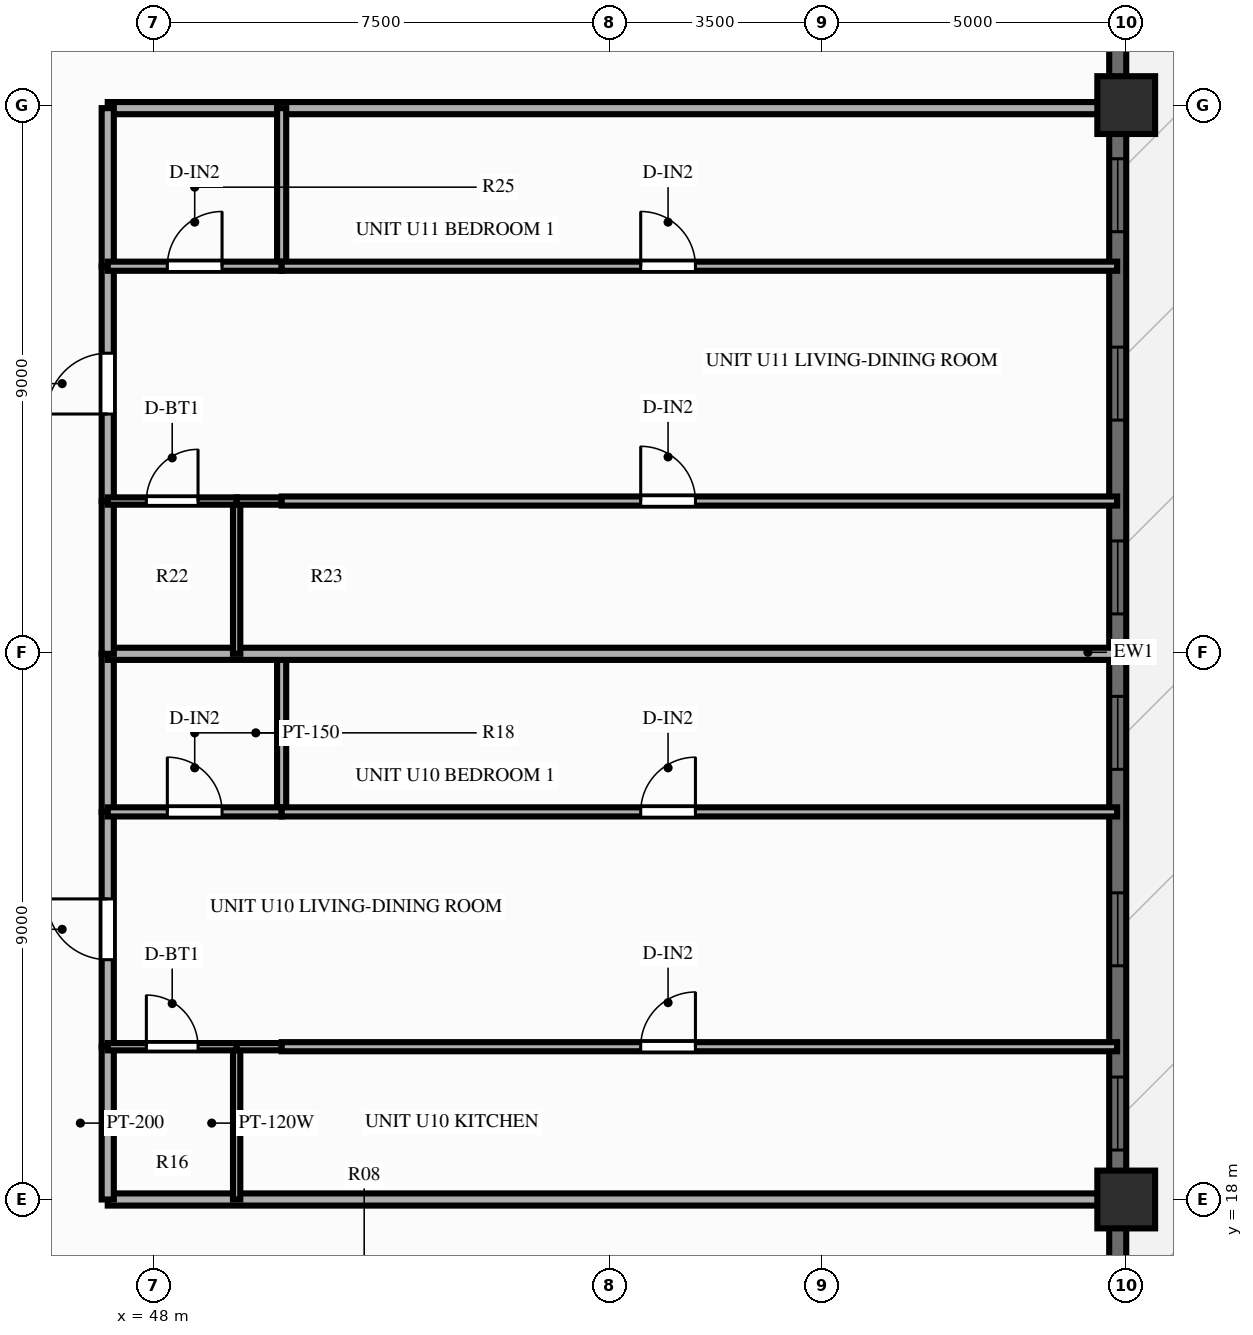
"""IFC4 building model, lengths in metres.
Left out: names, types, materials, properties, quantities, classifications, styles, units other than length and angle.
Written with IfcOpenShell. Run it as: python <this file> out.ifc"""

import sys

from ifc_helpers import new_model, si_unit, direction, frame, frame_2d, origin, origin_2d, place, context, subcontext, project, spatial, rectangle, extrude, source, transform, mapped, element, fill, save


model = new_model("IFC4")
c1 = context("Model", 3, precision=1e-05, world=origin(), true_north=direction((0.0, 1.0)))
c2 = subcontext(c1, "Body", "Model", "MODEL_VIEW")
j1 = project(units=[si_unit("LENGTHUNIT", "METRE"), si_unit("PLANEANGLEUNIT", "RADIAN")], contexts=[c1])
p1 = place(None, origin())
s1 = spatial("IfcSite", under=j1, at=p1, CompositionType="ELEMENT")
p2 = place(p1, origin())
s2 = spatial("IfcBuilding", under=s1, at=p2, CompositionType="ELEMENT")
p3 = place(p2, frame((0.0, 0.0, 83.85)))
s3 = spatial("IfcBuildingStorey", under=s2, at=p3, CompositionType="ELEMENT", Elevation=83.85)
m1 = source(origin(), c2, "Body", "SweptSolid", [
    extrude(rectangle(XDim=0.95, YDim=0.95, at=origin_2d()), origin(), (0.0, 0.0, 1.0), 3.0),
])
for number, where, z_axis, x_axis in (
    (1, (64.0, 18.0, 0.0), (0.0, 0.0, 1.0), (1.0, 0.0, 0.0)),
    (2, (64.0, 36.0, 0.0), (0.0, 0.0, 1.0), (1.0, 0.0, 0.0)),
):
    element("IfcColumn", number, at=place(p3, frame(where, z_axis=z_axis, x_axis=x_axis)), inside=s3, PredefinedType="COLUMN", context=c2, shape_type="MappedRepresentation", body=[
        mapped(m1, transform((0.0, 0.0, 0.0), scale=1.0)),
    ])
p4 = place(p3, frame((63.86, 7.2, 0.0), z_axis=(0.0, 0.0, 1.0), x_axis=(0.0, 1.0, 0.0)))
e3 = element("IfcWall", 3, at=p4, inside=s3, PredefinedType="SOLIDWALL", context=c2, shape_type="SweptSolid", body=[
    extrude(rectangle(XDim=39.6, YDim=0.28, at=frame_2d((19.8, 0.0))), origin(), (0.0, 0.0, 1.0), 2.28),
])
p5 = place(p4, frame((6.2, 0.0, 0.0), z_axis=(0.0, 0.0, 1.0), x_axis=(-1.0, 0.0, 0.0)))
e4 = element("IfcOpeningElement", 4, at=p5, cuts=e3, PredefinedType="OPENING", context=c2, shape_type="SweptSolid", body=[
    extrude(rectangle(XDim=1.6, YDim=2.15, at=frame_2d((0.8, 1.075))), frame((0.0, 0.152, 0.0), z_axis=(0.0, -1.0, 0.0), x_axis=(1.0, 0.0, 0.0)), (0.0, 0.0, 1.0), 0.304),
])
p6 = place(p4, frame((11.614, 0.0, 0.25)))
e5 = element("IfcOpeningElement", 5, at=p6, cuts=e3, PredefinedType="OPENING", context=c2, shape_type="SweptSolid", body=[
    extrude(rectangle(XDim=1.2, YDim=1.5, at=frame_2d((0.6, 0.75))), frame((0.0, 0.152, 0.0), z_axis=(0.0, -1.0, 0.0), x_axis=(1.0, 0.0, 0.0)), (0.0, 0.0, 1.0), 0.304),
])
p7 = place(p4, frame((14.644, 0.0, 0.25)))
e6 = element("IfcOpeningElement", 6, at=p7, cuts=e3, PredefinedType="OPENING", context=c2, shape_type="SweptSolid", body=[
    extrude(rectangle(XDim=1.2, YDim=1.5, at=frame_2d((0.6, 0.75))), frame((0.0, 0.152, 0.0), z_axis=(0.0, -1.0, 0.0), x_axis=(1.0, 0.0, 0.0)), (0.0, 0.0, 1.0), 0.304),
])
p8 = place(p4, frame((17.875, 0.0, 0.25)))
e7 = element("IfcOpeningElement", 7, at=p8, cuts=e3, PredefinedType="OPENING", context=c2, shape_type="SweptSolid", body=[
    extrude(rectangle(XDim=1.2, YDim=1.5, at=frame_2d((0.6, 0.75))), frame((0.0, 0.152, 0.0), z_axis=(0.0, -1.0, 0.0), x_axis=(1.0, 0.0, 0.0)), (0.0, 0.0, 1.0), 0.304),
])
p9 = place(p4, frame((20.431, 0.0, 0.25)))
e8 = element("IfcOpeningElement", 8, at=p9, cuts=e3, PredefinedType="OPENING", context=c2, shape_type="SweptSolid", body=[
    extrude(rectangle(XDim=1.2, YDim=1.5, at=frame_2d((0.6, 0.75))), frame((0.0, 0.152, 0.0), z_axis=(0.0, -1.0, 0.0), x_axis=(1.0, 0.0, 0.0)), (0.0, 0.0, 1.0), 0.304),
])
p10 = place(p4, frame((23.619, 0.0, 0.25)))
e9 = element("IfcOpeningElement", 9, at=p10, cuts=e3, PredefinedType="OPENING", context=c2, shape_type="SweptSolid", body=[
    extrude(rectangle(XDim=1.2, YDim=1.5, at=frame_2d((0.6, 0.75))), frame((0.0, 0.152, 0.0), z_axis=(0.0, -1.0, 0.0), x_axis=(1.0, 0.0, 0.0)), (0.0, 0.0, 1.0), 0.304),
])
p11 = place(p4, frame((26.718, 0.0, 0.25)))
e10 = element("IfcOpeningElement", 10, at=p11, cuts=e3, PredefinedType="OPENING", context=c2, shape_type="SweptSolid", body=[
    extrude(rectangle(XDim=1.2, YDim=1.5, at=frame_2d((0.6, 0.75))), frame((0.0, 0.152, 0.0), z_axis=(0.0, -1.0, 0.0), x_axis=(1.0, 0.0, 0.0)), (0.0, 0.0, 1.0), 0.304),
])
p12 = place(p4, frame((33.6, 0.0, 0.25)))
e11 = element("IfcOpeningElement", 11, at=p12, cuts=e3, PredefinedType="OPENING", context=c2, shape_type="SweptSolid", body=[
    extrude(rectangle(XDim=1.2, YDim=1.5, at=frame_2d((0.6, 0.75))), frame((0.0, 0.152, 0.0), z_axis=(0.0, -1.0, 0.0), x_axis=(1.0, 0.0, 0.0)), (0.0, 0.0, 1.0), 0.304),
])
for number, where, z_axis, x_axis in (
    (12, (47.25, 18.0, 0.0), (0.0, 0.0, 1.0), (1.0, 0.0, 0.0)),
    (13, (47.25, 35.95, 0.0), (0.0, 0.0, 1.0), (1.0, 0.0, 0.0)),
):
    element("IfcWall", number, at=place(p3, frame(where, z_axis=z_axis, x_axis=x_axis)), inside=s3, PredefinedType="PARTITIONING", context=c2, shape_type="SweptSolid", body=[
        extrude(rectangle(XDim=16.6, YDim=0.2, at=frame_2d((8.3, 0.0))), origin(), (0.0, 0.0, 1.0), 2.34),
    ])
p13 = place(p3, frame((47.25, 18.0, 0.0), z_axis=(0.0, 0.0, 1.0), x_axis=(0.0, 1.0, 0.0)))
e14 = element("IfcWall", 14, at=p13, inside=s3, PredefinedType="PARTITIONING", context=c2, shape_type="SweptSolid", body=[
    extrude(rectangle(XDim=2.513, YDim=0.2, at=frame_2d((1.256, 0.0))), origin(), (0.0, 0.0, 1.0), 2.79),
])
p14 = place(p3, frame((47.25, 20.513, 0.0), z_axis=(0.0, 0.0, 1.0), x_axis=(0.0, 1.0, 0.0)))
e15 = element("IfcWall", 15, at=p14, inside=s3, PredefinedType="PARTITIONING", context=c2, shape_type="SweptSolid", body=[
    extrude(rectangle(XDim=3.862, YDim=0.2, at=frame_2d((1.931, 0.0))), origin(), (0.0, 0.0, 1.0), 2.79),
])
p15 = place(p14, frame((1.431, 0.0, 0.0)))
e16 = element("IfcOpeningElement", 16, at=p15, cuts=e15, PredefinedType="OPENING", context=c2, shape_type="SweptSolid", body=[
    extrude(rectangle(XDim=1.0, YDim=2.15, at=frame_2d((0.5, 1.075))), frame((0.0, 0.112, 0.0), z_axis=(0.0, -1.0, 0.0), x_axis=(1.0, 0.0, 0.0)), (0.0, 0.0, 1.0), 0.224),
])
p16 = place(p3, frame((47.25, 24.375, 0.0), z_axis=(0.0, 0.0, 1.0), x_axis=(0.0, 1.0, 0.0)))
e17 = element("IfcWall", 17, at=p16, inside=s3, PredefinedType="PARTITIONING", context=c2, shape_type="SweptSolid", body=[
    extrude(rectangle(XDim=2.6, YDim=0.2, at=frame_2d((1.3, 0.0))), origin(), (0.0, 0.0, 1.0), 2.79),
])
p17 = place(p3, frame((49.37, 18.0, 0.0), z_axis=(0.0, 0.0, 1.0), x_axis=(0.0, 1.0, 0.0)))
e18 = element("IfcWall", 18, at=p17, inside=s3, PredefinedType="PARTITIONING", context=c2, shape_type="SweptSolid", body=[
    extrude(rectangle(XDim=2.513, YDim=0.12, at=frame_2d((1.256, 0.0))), origin(), (0.0, 0.0, 1.0), 2.79),
])
p18 = place(p3, frame((50.11, 24.375, 0.0), z_axis=(0.0, 0.0, 1.0), x_axis=(0.0, 1.0, 0.0)))
e19 = element("IfcWall", 19, at=p18, inside=s3, PredefinedType="PARTITIONING", context=c2, shape_type="SweptSolid", body=[
    extrude(rectangle(XDim=2.6, YDim=0.15, at=frame_2d((1.3, 0.0))), origin(), (0.0, 0.0, 1.0), 2.79),
])
p19 = place(p3, frame((47.25, 20.513, 0.0), z_axis=(0.0, 0.0, 1.0), x_axis=(1.0, 0.0, 0.0)))
e20 = element("IfcWall", 20, at=p19, inside=s3, PredefinedType="PARTITIONING", context=c2, shape_type="SweptSolid", body=[
    extrude(rectangle(XDim=2.12, YDim=0.12, at=frame_2d((1.06, 0.0))), origin(), (0.0, 0.0, 1.0), 2.79),
])
p20 = place(p19, frame((0.635, 0.0, 0.0)))
e21 = element("IfcOpeningElement", 21, at=p20, cuts=e20, PredefinedType="OPENING", context=c2, shape_type="SweptSolid", body=[
    extrude(rectangle(XDim=0.85, YDim=2.05, at=frame_2d((0.425, 1.025))), frame((0.0, 0.072, 0.0), z_axis=(0.0, -1.0, 0.0), x_axis=(1.0, 0.0, 0.0)), (0.0, 0.0, 1.0), 0.144),
])
p21 = place(p3, frame((49.37, 20.513, 0.0), z_axis=(0.0, 0.0, 1.0), x_axis=(1.0, 0.0, 0.0)))
e22 = element("IfcWall", 22, at=p21, inside=s3, PredefinedType="PARTITIONING", context=c2, shape_type="SweptSolid", body=[
    extrude(rectangle(XDim=0.74, YDim=0.12, at=frame_2d((0.37, 0.0))), origin(), (0.0, 0.0, 1.0), 2.79),
])
p22 = place(p3, frame((50.11, 20.513, 0.0), z_axis=(0.0, 0.0, 1.0), x_axis=(1.0, 0.0, 0.0)))
e23 = element("IfcWall", 23, at=p22, inside=s3, PredefinedType="PARTITIONING", context=c2, shape_type="SweptSolid", body=[
    extrude(rectangle(XDim=13.74, YDim=0.15, at=frame_2d((6.87, 0.0))), origin(), (0.0, 0.0, 1.0), 2.79),
])
p23 = place(p22, frame((5.905, 0.0, 0.0)))
e24 = element("IfcOpeningElement", 24, at=p23, cuts=e23, PredefinedType="OPENING", context=c2, shape_type="SweptSolid", body=[
    extrude(rectangle(XDim=0.9, YDim=2.1, at=frame_2d((0.45, 1.05))), frame((0.0, 0.087, 0.0), z_axis=(0.0, -1.0, 0.0), x_axis=(1.0, 0.0, 0.0)), (0.0, 0.0, 1.0), 0.174),
])
p24 = place(p3, frame((47.25, 24.375, 0.0), z_axis=(0.0, 0.0, 1.0), x_axis=(1.0, 0.0, 0.0)))
e25 = element("IfcWall", 25, at=p24, inside=s3, PredefinedType="PARTITIONING", context=c2, shape_type="SweptSolid", body=[
    extrude(rectangle(XDim=2.86, YDim=0.15, at=frame_2d((1.43, 0.0))), origin(), (0.0, 0.0, 1.0), 2.79),
])
p25 = place(p24, frame((0.98, 0.0, 0.0)))
e26 = element("IfcOpeningElement", 26, at=p25, cuts=e25, PredefinedType="OPENING", context=c2, shape_type="SweptSolid", body=[
    extrude(rectangle(XDim=0.9, YDim=2.1, at=frame_2d((0.45, 1.05))), frame((0.0, 0.087, 0.0), z_axis=(0.0, -1.0, 0.0), x_axis=(1.0, 0.0, 0.0)), (0.0, 0.0, 1.0), 0.174),
])
p26 = place(p3, frame((50.11, 24.375, 0.0), z_axis=(0.0, 0.0, 1.0), x_axis=(1.0, 0.0, 0.0)))
e27 = element("IfcWall", 27, at=p26, inside=s3, PredefinedType="PARTITIONING", context=c2, shape_type="SweptSolid", body=[
    extrude(rectangle(XDim=13.74, YDim=0.15, at=frame_2d((6.87, 0.0))), origin(), (0.0, 0.0, 1.0), 2.79),
])
p27 = place(p26, frame((5.905, 0.0, 0.0)))
e28 = element("IfcOpeningElement", 28, at=p27, cuts=e27, PredefinedType="OPENING", context=c2, shape_type="SweptSolid", body=[
    extrude(rectangle(XDim=0.9, YDim=2.1, at=frame_2d((0.45, 1.05))), frame((0.0, 0.087, 0.0), z_axis=(0.0, -1.0, 0.0), x_axis=(1.0, 0.0, 0.0)), (0.0, 0.0, 1.0), 0.174),
])
p28 = place(p3, frame((47.25, 26.975, 0.0), z_axis=(0.0, 0.0, 1.0), x_axis=(1.0, 0.0, 0.0)))
e29 = element("IfcWall", 29, at=p28, inside=s3, PredefinedType="PARTITIONING", context=c2, shape_type="SweptSolid", body=[
    extrude(rectangle(XDim=16.6, YDim=0.2, at=frame_2d((8.3, 0.0))), origin(), (0.0, 0.0, 1.0), 2.79),
])
p29 = place(p3, frame((47.25, 26.975, 0.0), z_axis=(0.0, 0.0, 1.0), x_axis=(0.0, 1.0, 0.0)))
e30 = element("IfcWall", 30, at=p29, inside=s3, PredefinedType="PARTITIONING", context=c2, shape_type="SweptSolid", body=[
    extrude(rectangle(XDim=2.513, YDim=0.2, at=frame_2d((1.256, 0.0))), origin(), (0.0, 0.0, 1.0), 2.79),
])
p30 = place(p3, frame((47.25, 29.488, 0.0), z_axis=(0.0, 0.0, 1.0), x_axis=(0.0, 1.0, 0.0)))
e31 = element("IfcWall", 31, at=p30, inside=s3, PredefinedType="PARTITIONING", context=c2, shape_type="SweptSolid", body=[
    extrude(rectangle(XDim=3.862, YDim=0.2, at=frame_2d((1.931, 0.0))), origin(), (0.0, 0.0, 1.0), 2.79),
])
p31 = place(p30, frame((1.431, 0.0, 0.0)))
e32 = element("IfcOpeningElement", 32, at=p31, cuts=e31, PredefinedType="OPENING", context=c2, shape_type="SweptSolid", body=[
    extrude(rectangle(XDim=1.0, YDim=2.15, at=frame_2d((0.5, 1.075))), frame((0.0, 0.112, 0.0), z_axis=(0.0, -1.0, 0.0), x_axis=(1.0, 0.0, 0.0)), (0.0, 0.0, 1.0), 0.224),
])
p32 = place(p3, frame((47.25, 33.35, 0.0), z_axis=(0.0, 0.0, 1.0), x_axis=(0.0, 1.0, 0.0)))
e33 = element("IfcWall", 33, at=p32, inside=s3, PredefinedType="PARTITIONING", context=c2, shape_type="SweptSolid", body=[
    extrude(rectangle(XDim=2.6, YDim=0.2, at=frame_2d((1.3, 0.0))), origin(), (0.0, 0.0, 1.0), 2.79),
])
p33 = place(p3, frame((49.37, 26.975, 0.0), z_axis=(0.0, 0.0, 1.0), x_axis=(0.0, 1.0, 0.0)))
e34 = element("IfcWall", 34, at=p33, inside=s3, PredefinedType="PARTITIONING", context=c2, shape_type="SweptSolid", body=[
    extrude(rectangle(XDim=2.513, YDim=0.12, at=frame_2d((1.256, 0.0))), origin(), (0.0, 0.0, 1.0), 2.79),
])
p34 = place(p3, frame((50.11, 33.35, 0.0), z_axis=(0.0, 0.0, 1.0), x_axis=(0.0, 1.0, 0.0)))
e35 = element("IfcWall", 35, at=p34, inside=s3, PredefinedType="PARTITIONING", context=c2, shape_type="SweptSolid", body=[
    extrude(rectangle(XDim=2.6, YDim=0.15, at=frame_2d((1.3, 0.0))), origin(), (0.0, 0.0, 1.0), 2.79),
])
p35 = place(p3, frame((47.25, 29.488, 0.0), z_axis=(0.0, 0.0, 1.0), x_axis=(1.0, 0.0, 0.0)))
e36 = element("IfcWall", 36, at=p35, inside=s3, PredefinedType="PARTITIONING", context=c2, shape_type="SweptSolid", body=[
    extrude(rectangle(XDim=2.12, YDim=0.12, at=frame_2d((1.06, 0.0))), origin(), (0.0, 0.0, 1.0), 2.79),
])
p36 = place(p35, frame((0.635, 0.0, 0.0)))
e37 = element("IfcOpeningElement", 37, at=p36, cuts=e36, PredefinedType="OPENING", context=c2, shape_type="SweptSolid", body=[
    extrude(rectangle(XDim=0.85, YDim=2.05, at=frame_2d((0.425, 1.025))), frame((0.0, 0.072, 0.0), z_axis=(0.0, -1.0, 0.0), x_axis=(1.0, 0.0, 0.0)), (0.0, 0.0, 1.0), 0.144),
])
p37 = place(p3, frame((49.37, 29.488, 0.0), z_axis=(0.0, 0.0, 1.0), x_axis=(1.0, 0.0, 0.0)))
e38 = element("IfcWall", 38, at=p37, inside=s3, PredefinedType="PARTITIONING", context=c2, shape_type="SweptSolid", body=[
    extrude(rectangle(XDim=0.74, YDim=0.12, at=frame_2d((0.37, 0.0))), origin(), (0.0, 0.0, 1.0), 2.79),
])
p38 = place(p3, frame((50.11, 29.488, 0.0), z_axis=(0.0, 0.0, 1.0), x_axis=(1.0, 0.0, 0.0)))
e39 = element("IfcWall", 39, at=p38, inside=s3, PredefinedType="PARTITIONING", context=c2, shape_type="SweptSolid", body=[
    extrude(rectangle(XDim=13.74, YDim=0.15, at=frame_2d((6.87, 0.0))), origin(), (0.0, 0.0, 1.0), 2.79),
])
p39 = place(p38, frame((5.905, 0.0, 0.0)))
e40 = element("IfcOpeningElement", 40, at=p39, cuts=e39, PredefinedType="OPENING", context=c2, shape_type="SweptSolid", body=[
    extrude(rectangle(XDim=0.9, YDim=2.1, at=frame_2d((0.45, 1.05))), frame((0.0, 0.087, 0.0), z_axis=(0.0, -1.0, 0.0), x_axis=(1.0, 0.0, 0.0)), (0.0, 0.0, 1.0), 0.174),
])
p40 = place(p3, frame((47.25, 33.35, 0.0), z_axis=(0.0, 0.0, 1.0), x_axis=(1.0, 0.0, 0.0)))
e41 = element("IfcWall", 41, at=p40, inside=s3, PredefinedType="PARTITIONING", context=c2, shape_type="SweptSolid", body=[
    extrude(rectangle(XDim=2.86, YDim=0.15, at=frame_2d((1.43, 0.0))), origin(), (0.0, 0.0, 1.0), 2.79),
])
p41 = place(p40, frame((0.98, 0.0, 0.0)))
e42 = element("IfcOpeningElement", 42, at=p41, cuts=e41, PredefinedType="OPENING", context=c2, shape_type="SweptSolid", body=[
    extrude(rectangle(XDim=0.9, YDim=2.1, at=frame_2d((0.45, 1.05))), frame((0.0, 0.087, 0.0), z_axis=(0.0, -1.0, 0.0), x_axis=(1.0, 0.0, 0.0)), (0.0, 0.0, 1.0), 0.174),
])
p42 = place(p3, frame((50.11, 33.35, 0.0), z_axis=(0.0, 0.0, 1.0), x_axis=(1.0, 0.0, 0.0)))
e43 = element("IfcWall", 43, at=p42, inside=s3, PredefinedType="PARTITIONING", context=c2, shape_type="SweptSolid", body=[
    extrude(rectangle(XDim=13.74, YDim=0.15, at=frame_2d((6.87, 0.0))), origin(), (0.0, 0.0, 1.0), 2.79),
])
p43 = place(p42, frame((5.905, 0.0, 0.0)))
e44 = element("IfcOpeningElement", 44, at=p43, cuts=e43, PredefinedType="OPENING", context=c2, shape_type="SweptSolid", body=[
    extrude(rectangle(XDim=0.9, YDim=2.1, at=frame_2d((0.45, 1.05))), frame((0.0, 0.087, 0.0), z_axis=(0.0, -1.0, 0.0), x_axis=(1.0, 0.0, 0.0)), (0.0, 0.0, 1.0), 0.174),
])
m2 = source(origin(), c2, "Body", "SweptSolid", [
    extrude(rectangle(XDim=1.2, YDim=1.5, at=frame_2d((0.6, 0.75))), frame((0.0, 0.03, 0.0), z_axis=(0.0, -1.0, 0.0), x_axis=(1.0, 0.0, 0.0)), (0.0, 0.0, 1.0), 0.06),
])
p44 = place(p6, origin())
e45 = element("IfcWindow", 45, at=p44, inside=s3, PartitioningType="SINGLE_PANEL", PredefinedType="WINDOW", context=c2, shape_type="MappedRepresentation", body=[
    mapped(m2, transform((0.0, 0.0, 0.0), scale=1.0)),
])
fill(e5, e45)
p45 = place(p7, origin())
e46 = element("IfcWindow", 46, at=p45, inside=s3, PartitioningType="SINGLE_PANEL", PredefinedType="WINDOW", context=c2, shape_type="MappedRepresentation", body=[
    mapped(m2, transform((0.0, 0.0, 0.0), scale=1.0)),
])
fill(e6, e46)
p46 = place(p8, origin())
e47 = element("IfcWindow", 47, at=p46, inside=s3, PartitioningType="SINGLE_PANEL", PredefinedType="WINDOW", context=c2, shape_type="MappedRepresentation", body=[
    mapped(m2, transform((0.0, 0.0, 0.0), scale=1.0)),
])
fill(e7, e47)
p47 = place(p9, origin())
e48 = element("IfcWindow", 48, at=p47, inside=s3, PartitioningType="SINGLE_PANEL", PredefinedType="WINDOW", context=c2, shape_type="MappedRepresentation", body=[
    mapped(m2, transform((0.0, 0.0, 0.0), scale=1.0)),
])
fill(e8, e48)
p48 = place(p10, origin())
e49 = element("IfcWindow", 49, at=p48, inside=s3, PartitioningType="SINGLE_PANEL", PredefinedType="WINDOW", context=c2, shape_type="MappedRepresentation", body=[
    mapped(m2, transform((0.0, 0.0, 0.0), scale=1.0)),
])
fill(e9, e49)
p49 = place(p11, origin())
e50 = element("IfcWindow", 50, at=p49, inside=s3, PartitioningType="SINGLE_PANEL", PredefinedType="WINDOW", context=c2, shape_type="MappedRepresentation", body=[
    mapped(m2, transform((0.0, 0.0, 0.0), scale=1.0)),
])
fill(e10, e50)
m3 = source(origin(), c2, "Body", "SweptSolid", [
    extrude(rectangle(XDim=1.0, YDim=2.15, at=frame_2d((0.5, 1.075))), frame((0.0, 0.025, 0.0), z_axis=(0.0, -1.0, 0.0), x_axis=(1.0, 0.0, 0.0)), (0.0, 0.0, 1.0), 0.05),
])
p50 = place(p15, origin())
e51 = element("IfcDoor", 51, at=p50, inside=s3, OperationType="SINGLE_SWING_RIGHT", PredefinedType="DOOR", context=c2, shape_type="MappedRepresentation", body=[
    mapped(m3, transform((0.0, 0.0, 0.0), scale=1.0)),
])
fill(e16, e51)
m4 = source(origin(), c2, "Body", "SweptSolid", [
    extrude(rectangle(XDim=0.85, YDim=2.05, at=frame_2d((0.425, 1.025))), frame((0.0, 0.025, 0.0), z_axis=(0.0, -1.0, 0.0), x_axis=(1.0, 0.0, 0.0)), (0.0, 0.0, 1.0), 0.05),
])
p51 = place(p20, origin())
e52 = element("IfcDoor", 52, at=p51, inside=s3, OperationType="SINGLE_SWING_LEFT", PredefinedType="DOOR", context=c2, shape_type="MappedRepresentation", body=[
    mapped(m4, transform((0.0, 0.0, 0.0), scale=1.0)),
])
fill(e21, e52)
m5 = source(origin(), c2, "Body", "SweptSolid", [
    extrude(rectangle(XDim=0.9, YDim=2.1, at=frame_2d((0.45, 1.05))), frame((0.0, 0.025, 0.0), z_axis=(0.0, -1.0, 0.0), x_axis=(1.0, 0.0, 0.0)), (0.0, 0.0, 1.0), 0.05),
])
p52 = place(p23, origin())
e53 = element("IfcDoor", 53, at=p52, inside=s3, OperationType="SINGLE_SWING_RIGHT", PredefinedType="DOOR", context=c2, shape_type="MappedRepresentation", body=[
    mapped(m5, transform((0.0, 0.0, 0.0), scale=1.0)),
])
fill(e24, e53)
p53 = place(p25, origin())
e54 = element("IfcDoor", 54, at=p53, inside=s3, OperationType="SINGLE_SWING_LEFT", PredefinedType="DOOR", context=c2, shape_type="MappedRepresentation", body=[
    mapped(m5, transform((0.0, 0.0, 0.0), scale=1.0)),
])
fill(e26, e54)
p54 = place(p27, origin())
e55 = element("IfcDoor", 55, at=p54, inside=s3, OperationType="SINGLE_SWING_RIGHT", PredefinedType="DOOR", context=c2, shape_type="MappedRepresentation", body=[
    mapped(m5, transform((0.0, 0.0, 0.0), scale=1.0)),
])
fill(e28, e55)
p55 = place(p31, origin())
e56 = element("IfcDoor", 56, at=p55, inside=s3, OperationType="SINGLE_SWING_LEFT", PredefinedType="DOOR", context=c2, shape_type="MappedRepresentation", body=[
    mapped(m3, transform((0.0, 0.0, 0.0), scale=1.0)),
])
fill(e32, e56)
p56 = place(p36, origin())
e57 = element("IfcDoor", 57, at=p56, inside=s3, OperationType="SINGLE_SWING_RIGHT", PredefinedType="DOOR", context=c2, shape_type="MappedRepresentation", body=[
    mapped(m4, transform((0.0, 0.0, 0.0), scale=1.0)),
])
fill(e37, e57)
p57 = place(p39, origin())
e58 = element("IfcDoor", 58, at=p57, inside=s3, OperationType="SINGLE_SWING_LEFT", PredefinedType="DOOR", context=c2, shape_type="MappedRepresentation", body=[
    mapped(m5, transform((0.0, 0.0, 0.0), scale=1.0)),
])
fill(e40, e58)
p58 = place(p41, origin())
e59 = element("IfcDoor", 59, at=p58, inside=s3, OperationType="SINGLE_SWING_RIGHT", PredefinedType="DOOR", context=c2, shape_type="MappedRepresentation", body=[
    mapped(m5, transform((0.0, 0.0, 0.0), scale=1.0)),
])
fill(e42, e59)
p59 = place(p43, origin())
e60 = element("IfcDoor", 60, at=p59, inside=s3, OperationType="SINGLE_SWING_LEFT", PredefinedType="DOOR", context=c2, shape_type="MappedRepresentation", body=[
    mapped(m5, transform((0.0, 0.0, 0.0), scale=1.0)),
])
fill(e44, e60)
save(model, sys.argv[1])
